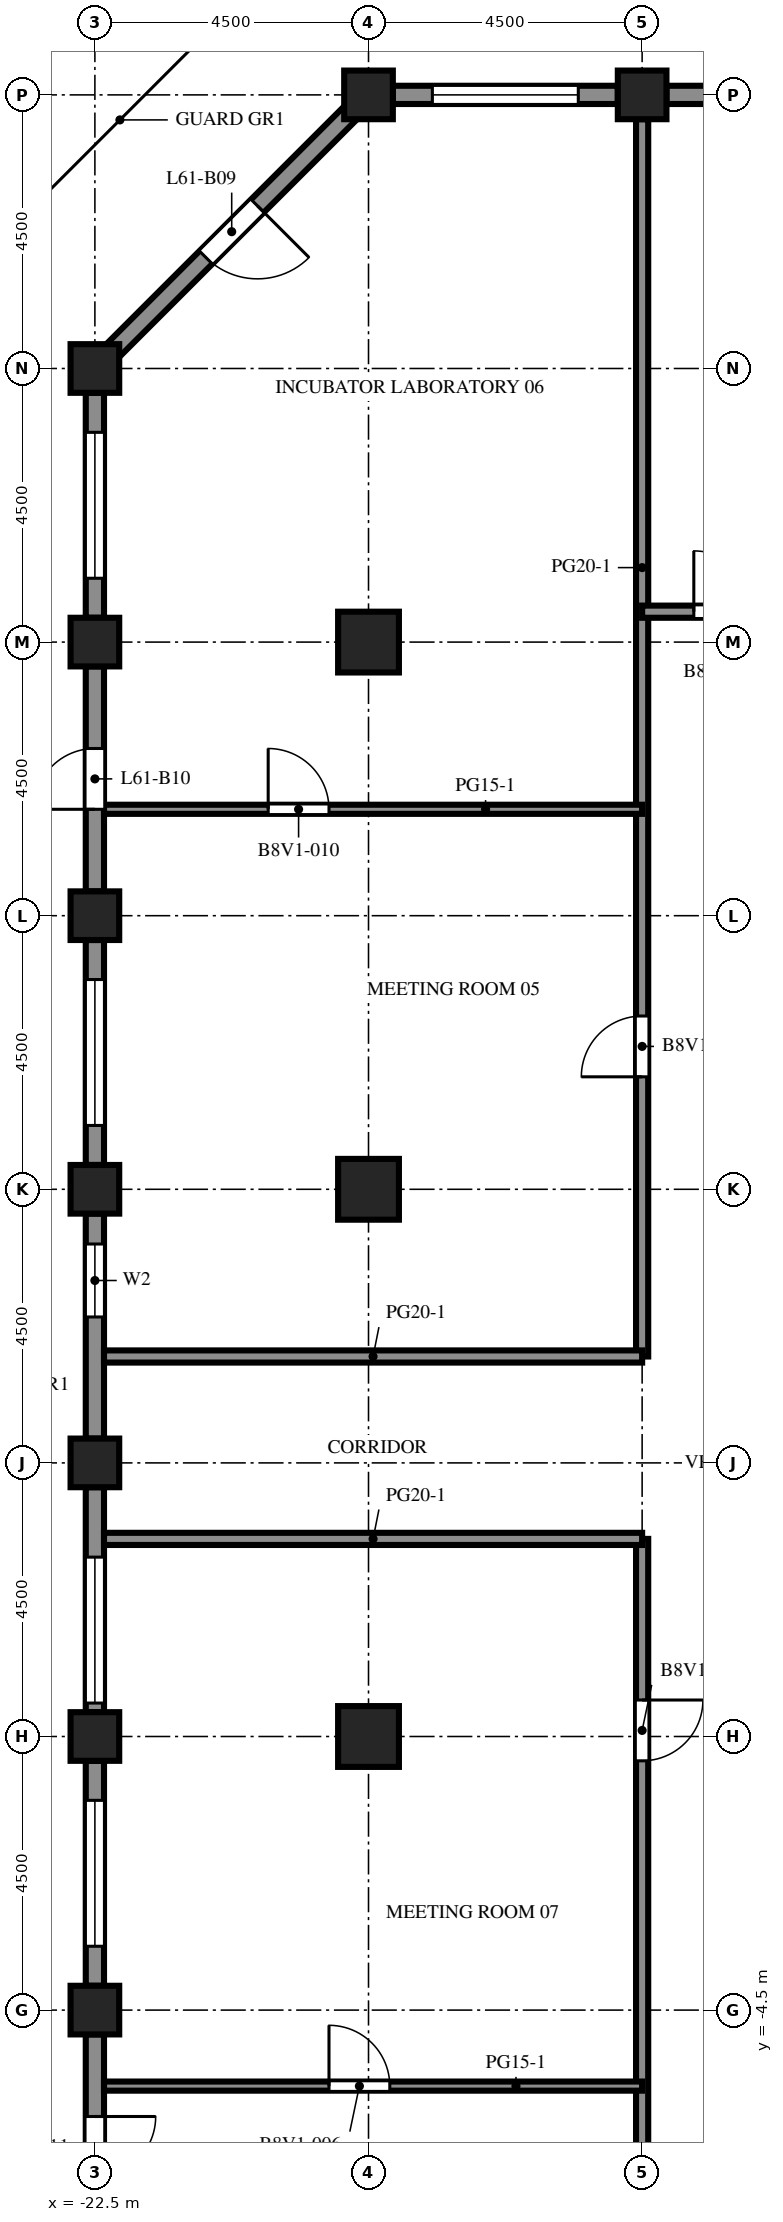
"""IFC4 building model, lengths in metres.
Left out: names, types, materials, properties, quantities, classifications, styles, units other than length and angle.
Written with IfcOpenShell. Run it as: python <this file> out.ifc"""

import sys

from ifc_helpers import new_model, si_unit, direction, frame, frame_2d, origin, origin_2d, place, context, subcontext, project, spatial, rectangle, extrude, element, fill, save


model = new_model("IFC4")
c1 = context("Model", 3, precision=1e-05, world=origin(), true_north=direction((0.0, 1.0)))
c2 = subcontext(c1, "Body", "Model", "MODEL_VIEW")
j1 = project(units=[si_unit("LENGTHUNIT", "METRE"), si_unit("PLANEANGLEUNIT", "RADIAN")], contexts=[c1])
p1 = place(None, origin())
s1 = spatial("IfcSite", under=j1, at=p1, CompositionType="ELEMENT")
p2 = place(p1, origin())
s2 = spatial("IfcBuilding", under=s1, at=p2, CompositionType="ELEMENT")
p3 = place(p2, frame((0.0, 0.0, 270.4)))
s3 = spatial("IfcBuildingStorey", under=s2, at=p3, CompositionType="ELEMENT", Elevation=270.4)
for number, where, z_axis, x_axis in (
    (1, (-22.5, -4.5, 0.0), (0.0, 0.0, 1.0), (1.0, 0.0, 0.0)),
    (2, (-22.5, 0.0, 0.0), (0.0, 0.0, 1.0), (1.0, 0.0, 0.0)),
    (3, (-22.5, 4.5, 0.0), (0.0, 0.0, 1.0), (1.0, 0.0, 0.0)),
    (4, (-22.5, 9.0, 0.0), (0.0, 0.0, 1.0), (1.0, 0.0, 0.0)),
    (5, (-22.5, 13.5, 0.0), (0.0, 0.0, 1.0), (1.0, 0.0, 0.0)),
    (6, (-22.5, 18.0, 0.0), (0.0, 0.0, 1.0), (1.0, 0.0, 0.0)),
    (7, (-22.5, 22.5, 0.0), (0.0, 0.0, 1.0), (1.0, 0.0, 0.0)),
    (8, (-18.0, 27.0, 0.0), (0.0, 0.0, 1.0), (1.0, 0.0, 0.0)),
    (9, (-13.5, 27.0, 0.0), (0.0, 0.0, 1.0), (1.0, 0.0, 0.0)),
):
    element("IfcColumn", number, at=place(p3, frame(where, z_axis=z_axis, x_axis=x_axis)), inside=s3, PredefinedType="COLUMN", context=c2, shape_type="SweptSolid", body=[
        extrude(rectangle(XDim=0.8, YDim=0.8, at=origin_2d()), origin(), (0.0, 0.0, 1.0), 4.1),
    ])
for number, where, z_axis, x_axis in (
    (10, (-18.0, 0.0, 0.0), (0.0, 0.0, 1.0), (1.0, 0.0, 0.0)),
    (11, (-18.0, 9.0, 0.0), (0.0, 0.0, 1.0), (1.0, 0.0, 0.0)),
    (12, (-18.0, 18.0, 0.0), (0.0, 0.0, 1.0), (1.0, 0.0, 0.0)),
):
    element("IfcColumn", number, at=place(p3, frame(where, z_axis=z_axis, x_axis=x_axis)), inside=s3, PredefinedType="COLUMN", context=c2, shape_type="SweptSolid", body=[
        extrude(rectangle(XDim=1.0, YDim=1.0, at=origin_2d()), origin(), (0.0, 0.0, 1.0), 4.1),
    ])
p4 = place(p3, frame((-13.1, 27.0, 0.0), z_axis=(0.0, 0.0, 1.0), x_axis=(1.0, 0.0, 0.0)))
e13 = element("IfcWall", 13, at=p4, inside=s3, PredefinedType="SOLIDWALL", context=c2, shape_type="SweptSolid", body=[
    extrude(rectangle(XDim=3.7, YDim=0.3, at=frame_2d((1.85, 0.0))), origin(), (0.0, 0.0, 1.0), 2.85),
])
p5 = place(p4, frame((1.35, 0.0, 0.0)))
e14 = element("IfcOpeningElement", 14, at=p5, cuts=e13, PredefinedType="OPENING", context=c2, shape_type="SweptSolid", body=[
    extrude(rectangle(XDim=1.0, YDim=2.2, at=frame_2d((0.5, 1.1))), frame((0.0, 0.16, 0.0), z_axis=(0.0, -1.0, 0.0), x_axis=(1.0, 0.0, 0.0)), (0.0, 0.0, 1.0), 0.32),
])
p6 = place(p3, frame((-17.6, 27.0, 0.0), z_axis=(0.0, 0.0, 1.0), x_axis=(1.0, 0.0, 0.0)))
e15 = element("IfcWall", 15, at=p6, inside=s3, PredefinedType="SOLIDWALL", context=c2, shape_type="SweptSolid", body=[
    extrude(rectangle(XDim=3.7, YDim=0.3, at=frame_2d((1.85, 0.0))), origin(), (0.0, 0.0, 1.0), 2.85),
])
p7 = place(p6, frame((0.65, 0.0, 0.8)))
e16 = element("IfcOpeningElement", 16, at=p7, cuts=e15, PredefinedType="OPENING", context=c2, shape_type="SweptSolid", body=[
    extrude(rectangle(XDim=2.4, YDim=1.7, at=frame_2d((1.2, 0.85))), frame((0.0, 0.16, 0.0), z_axis=(0.0, -1.0, 0.0), x_axis=(1.0, 0.0, 0.0)), (0.0, 0.0, 1.0), 0.32),
])
p8 = place(p3, frame((-22.206, 22.794, 0.0), z_axis=(0.0, 0.0, 1.0), x_axis=(0.707106781187, 0.707106781187, 0.0)))
e17 = element("IfcWall", 17, at=p8, inside=s3, PredefinedType="SOLIDWALL", context=c2, shape_type="SweptSolid", body=[
    extrude(rectangle(XDim=5.532, YDim=0.3, at=frame_2d((2.766, 0.0))), origin(), (0.0, 0.0, 1.0), 2.85),
])
p9 = place(p8, frame((2.166, 0.0, 0.0)))
e18 = element("IfcOpeningElement", 18, at=p9, cuts=e17, PredefinedType="OPENING", context=c2, shape_type="SweptSolid", body=[
    extrude(rectangle(XDim=1.2, YDim=2.2, at=frame_2d((0.6, 1.1))), frame((0.0, 0.16, 0.0), z_axis=(0.0, -1.0, 0.0), x_axis=(1.0, 0.0, 0.0)), (0.0, 0.0, 1.0), 0.32),
])
p10 = place(p3, frame((-22.5, 18.4, 0.0), z_axis=(0.0, 0.0, 1.0), x_axis=(0.0, 1.0, 0.0)))
e19 = element("IfcWall", 19, at=p10, inside=s3, PredefinedType="SOLIDWALL", context=c2, shape_type="SweptSolid", body=[
    extrude(rectangle(XDim=3.7, YDim=0.3, at=frame_2d((1.85, 0.0))), origin(), (0.0, 0.0, 1.0), 2.85),
])
p11 = place(p10, frame((0.65, 0.0, 0.8)))
e20 = element("IfcOpeningElement", 20, at=p11, cuts=e19, PredefinedType="OPENING", context=c2, shape_type="SweptSolid", body=[
    extrude(rectangle(XDim=2.4, YDim=1.7, at=frame_2d((1.2, 0.85))), frame((0.0, 0.16, 0.0), z_axis=(0.0, -1.0, 0.0), x_axis=(1.0, 0.0, 0.0)), (0.0, 0.0, 1.0), 0.32),
])
p12 = place(p3, frame((-22.5, 13.9, 0.0), z_axis=(0.0, 0.0, 1.0), x_axis=(0.0, 1.0, 0.0)))
e21 = element("IfcWall", 21, at=p12, inside=s3, PredefinedType="SOLIDWALL", context=c2, shape_type="SweptSolid", body=[
    extrude(rectangle(XDim=3.7, YDim=0.3, at=frame_2d((1.85, 0.0))), origin(), (0.0, 0.0, 1.0), 2.85),
])
p13 = place(p12, frame((1.35, 0.0, 0.0)))
e22 = element("IfcOpeningElement", 22, at=p13, cuts=e21, PredefinedType="OPENING", context=c2, shape_type="SweptSolid", body=[
    extrude(rectangle(XDim=1.0, YDim=2.2, at=frame_2d((0.5, 1.1))), frame((0.0, 0.16, 0.0), z_axis=(0.0, -1.0, 0.0), x_axis=(1.0, 0.0, 0.0)), (0.0, 0.0, 1.0), 0.32),
])
p14 = place(p3, frame((-22.5, 9.4, 0.0), z_axis=(0.0, 0.0, 1.0), x_axis=(0.0, 1.0, 0.0)))
e23 = element("IfcWall", 23, at=p14, inside=s3, PredefinedType="SOLIDWALL", context=c2, shape_type="SweptSolid", body=[
    extrude(rectangle(XDim=3.7, YDim=0.3, at=frame_2d((1.85, 0.0))), origin(), (0.0, 0.0, 1.0), 2.85),
])
p15 = place(p14, frame((0.65, 0.0, 0.8)))
e24 = element("IfcOpeningElement", 24, at=p15, cuts=e23, PredefinedType="OPENING", context=c2, shape_type="SweptSolid", body=[
    extrude(rectangle(XDim=2.4, YDim=1.7, at=frame_2d((1.2, 0.85))), frame((0.0, 0.16, 0.0), z_axis=(0.0, -1.0, 0.0), x_axis=(1.0, 0.0, 0.0)), (0.0, 0.0, 1.0), 0.32),
])
p16 = place(p3, frame((-22.5, 4.9, 0.0), z_axis=(0.0, 0.0, 1.0), x_axis=(0.0, 1.0, 0.0)))
e25 = element("IfcWall", 25, at=p16, inside=s3, PredefinedType="SOLIDWALL", context=c2, shape_type="SweptSolid", body=[
    extrude(rectangle(XDim=3.7, YDim=0.3, at=frame_2d((1.85, 0.0))), origin(), (0.0, 0.0, 1.0), 2.85),
])
p17 = place(p16, frame((2.0, 0.0, 0.8)))
e26 = element("IfcOpeningElement", 26, at=p17, cuts=e25, PredefinedType="OPENING", context=c2, shape_type="SweptSolid", body=[
    extrude(rectangle(XDim=1.2, YDim=1.7, at=frame_2d((0.6, 0.85))), frame((0.0, 0.16, 0.0), z_axis=(0.0, -1.0, 0.0), x_axis=(1.0, 0.0, 0.0)), (0.0, 0.0, 1.0), 0.32),
])
p18 = place(p3, frame((-22.5, 0.4, 0.0), z_axis=(0.0, 0.0, 1.0), x_axis=(0.0, 1.0, 0.0)))
e27 = element("IfcWall", 27, at=p18, inside=s3, PredefinedType="SOLIDWALL", context=c2, shape_type="SweptSolid", body=[
    extrude(rectangle(XDim=3.7, YDim=0.3, at=frame_2d((1.85, 0.0))), origin(), (0.0, 0.0, 1.0), 2.85),
])
p19 = place(p18, frame((0.15, 0.0, 0.8)))
e28 = element("IfcOpeningElement", 28, at=p19, cuts=e27, PredefinedType="OPENING", context=c2, shape_type="SweptSolid", body=[
    extrude(rectangle(XDim=2.4, YDim=1.7, at=frame_2d((1.2, 0.85))), frame((0.0, 0.16, 0.0), z_axis=(0.0, -1.0, 0.0), x_axis=(1.0, 0.0, 0.0)), (0.0, 0.0, 1.0), 0.32),
])
p20 = place(p3, frame((-22.5, -4.1, 0.0), z_axis=(0.0, 0.0, 1.0), x_axis=(0.0, 1.0, 0.0)))
e29 = element("IfcWall", 29, at=p20, inside=s3, PredefinedType="SOLIDWALL", context=c2, shape_type="SweptSolid", body=[
    extrude(rectangle(XDim=3.7, YDim=0.3, at=frame_2d((1.85, 0.0))), origin(), (0.0, 0.0, 1.0), 2.85),
])
p21 = place(p20, frame((0.65, 0.0, 0.8)))
e30 = element("IfcOpeningElement", 30, at=p21, cuts=e29, PredefinedType="OPENING", context=c2, shape_type="SweptSolid", body=[
    extrude(rectangle(XDim=2.4, YDim=1.7, at=frame_2d((1.2, 0.85))), frame((0.0, 0.16, 0.0), z_axis=(0.0, -1.0, 0.0), x_axis=(1.0, 0.0, 0.0)), (0.0, 0.0, 1.0), 0.32),
])
p22 = place(p3, frame((-22.5, -8.6, 0.0), z_axis=(0.0, 0.0, 1.0), x_axis=(0.0, 1.0, 0.0)))
e31 = element("IfcWall", 31, at=p22, inside=s3, PredefinedType="SOLIDWALL", context=c2, shape_type="SweptSolid", body=[
    extrude(rectangle(XDim=3.7, YDim=0.3, at=frame_2d((1.85, 0.0))), origin(), (0.0, 0.0, 1.0), 2.85),
])
p23 = place(p22, frame((1.35, 0.0, 0.0)))
e32 = element("IfcOpeningElement", 32, at=p23, cuts=e31, PredefinedType="OPENING", context=c2, shape_type="SweptSolid", body=[
    extrude(rectangle(XDim=1.0, YDim=2.2, at=frame_2d((0.5, 1.1))), frame((0.0, 0.16, 0.0), z_axis=(0.0, -1.0, 0.0), x_axis=(1.0, 0.0, 0.0)), (0.0, 0.0, 1.0), 0.32),
])
p24 = place(p3, frame((-13.5, -17.6, 0.0), z_axis=(0.0, 0.0, 1.0), x_axis=(0.0, 1.0, 0.0)))
e33 = element("IfcWall", 33, at=p24, inside=s3, PredefinedType="PARTITIONING", context=c2, shape_type="SweptSolid", body=[
    extrude(rectangle(XDim=20.85, YDim=0.2, at=frame_2d((10.425, 0.0))), origin(), (0.0, 0.0, 1.0), 3.65),
])
p25 = place(p24, frame((17.2, 0.0, 0.0)))
e34 = element("IfcOpeningElement", 34, at=p25, cuts=e33, PredefinedType="OPENING", context=c2, shape_type="SweptSolid", body=[
    extrude(rectangle(XDim=1.0, YDim=2.1, at=frame_2d((0.5, 1.05))), frame((0.0, 0.11, 0.0), z_axis=(0.0, -1.0, 0.0), x_axis=(1.0, 0.0, 0.0)), (0.0, 0.0, 1.0), 0.22),
])
p26 = place(p3, frame((-13.5, 6.25, 0.0), z_axis=(0.0, 0.0, 1.0), x_axis=(0.0, 1.0, 0.0)))
e35 = element("IfcWall", 35, at=p26, inside=s3, PredefinedType="PARTITIONING", context=c2, shape_type="SweptSolid", body=[
    extrude(rectangle(XDim=20.35, YDim=0.2, at=frame_2d((10.175, 0.0))), origin(), (0.0, 0.0, 1.0), 3.65),
])
p27 = place(p26, frame((4.6, 0.0, 0.0)))
e36 = element("IfcOpeningElement", 36, at=p27, cuts=e35, PredefinedType="OPENING", context=c2, shape_type="SweptSolid", body=[
    extrude(rectangle(XDim=1.0, YDim=2.1, at=frame_2d((0.5, 1.05))), frame((0.0, 0.11, 0.0), z_axis=(0.0, -1.0, 0.0), x_axis=(1.0, 0.0, 0.0)), (0.0, 0.0, 1.0), 0.22),
])
p28 = place(p3, frame((-13.5, -5.75, 0.0), z_axis=(0.0, 0.0, 1.0), x_axis=(-1.0, 0.0, 0.0)))
e37 = element("IfcWall", 37, at=p28, inside=s3, PredefinedType="PARTITIONING", context=c2, shape_type="SweptSolid", body=[
    extrude(rectangle(XDim=8.85, YDim=0.15, at=frame_2d((4.425, 0.0))), origin(), (0.0, 0.0, 1.0), 3.65),
])
p29 = place(p28, frame((4.15, 0.0, 0.0)))
e38 = element("IfcOpeningElement", 38, at=p29, cuts=e37, PredefinedType="OPENING", context=c2, shape_type="SweptSolid", body=[
    extrude(rectangle(XDim=1.0, YDim=2.1, at=frame_2d((0.5, 1.05))), frame((0.0, 0.085, 0.0), z_axis=(0.0, -1.0, 0.0), x_axis=(1.0, 0.0, 0.0)), (0.0, 0.0, 1.0), 0.17),
])
for number, where, z_axis, x_axis in (
    (39, (-22.35, 3.25, 0.0), (0.0, 0.0, 1.0), (1.0, 0.0, 0.0)),
    (40, (-22.35, 6.25, 0.0), (0.0, 0.0, 1.0), (1.0, 0.0, 0.0)),
):
    element("IfcWall", number, at=place(p3, frame(where, z_axis=z_axis, x_axis=x_axis)), inside=s3, PredefinedType="PARTITIONING", context=c2, shape_type="SweptSolid", body=[
        extrude(rectangle(XDim=8.85, YDim=0.2, at=frame_2d((4.425, 0.0))), origin(), (0.0, 0.0, 1.0), 3.65),
    ])
p30 = place(p3, frame((-22.35, 15.25, 0.0), z_axis=(0.0, 0.0, 1.0), x_axis=(1.0, 0.0, 0.0)))
e41 = element("IfcWall", 41, at=p30, inside=s3, PredefinedType="PARTITIONING", context=c2, shape_type="SweptSolid", body=[
    extrude(rectangle(XDim=8.85, YDim=0.15, at=frame_2d((4.425, 0.0))), origin(), (0.0, 0.0, 1.0), 3.65),
])
p31 = place(p30, frame((2.7, 0.0, 0.0)))
e42 = element("IfcOpeningElement", 42, at=p31, cuts=e41, PredefinedType="OPENING", context=c2, shape_type="SweptSolid", body=[
    extrude(rectangle(XDim=1.0, YDim=2.1, at=frame_2d((0.5, 1.05))), frame((0.0, 0.085, 0.0), z_axis=(0.0, -1.0, 0.0), x_axis=(1.0, 0.0, 0.0)), (0.0, 0.0, 1.0), 0.17),
])
p32 = place(p3, frame((-13.5, 18.5, 0.0), z_axis=(0.0, 0.0, 1.0), x_axis=(1.0, 0.0, 0.0)))
e43 = element("IfcWall", 43, at=p32, inside=s3, PredefinedType="PARTITIONING", context=c2, shape_type="SweptSolid", body=[
    extrude(rectangle(XDim=3.0, YDim=0.2, at=frame_2d((1.5, 0.0))), origin(), (0.0, 0.0, 1.0), 3.65),
])
p33 = place(p32, frame((0.85, 0.0, 0.0)))
e44 = element("IfcOpeningElement", 44, at=p33, cuts=e43, PredefinedType="OPENING", context=c2, shape_type="SweptSolid", body=[
    extrude(rectangle(XDim=1.0, YDim=2.1, at=frame_2d((0.5, 1.05))), frame((0.0, 0.11, 0.0), z_axis=(0.0, -1.0, 0.0), x_axis=(1.0, 0.0, 0.0)), (0.0, 0.0, 1.0), 0.22),
])
p34 = place(p7, origin())
e45 = element("IfcWindow", 45, at=p34, inside=s3, PartitioningType="SINGLE_PANEL", PredefinedType="WINDOW", context=c2, shape_type="SweptSolid", body=[
    extrude(rectangle(XDim=2.4, YDim=1.7, at=frame_2d((1.2, 0.85))), frame((0.0, 0.03, 0.0), z_axis=(0.0, -1.0, 0.0), x_axis=(1.0, 0.0, 0.0)), (0.0, 0.0, 1.0), 0.06),
])
fill(e16, e45)
p35 = place(p9, origin())
e46 = element("IfcDoor", 46, at=p35, inside=s3, OperationType="SINGLE_SWING_RIGHT", PredefinedType="DOOR", context=c2, shape_type="SweptSolid", body=[
    extrude(rectangle(XDim=1.2, YDim=2.2, at=frame_2d((0.6, 1.1))), frame((0.0, 0.025, 0.0), z_axis=(0.0, -1.0, 0.0), x_axis=(1.0, 0.0, 0.0)), (0.0, 0.0, 1.0), 0.05),
])
fill(e18, e46)
p36 = place(p11, origin())
e47 = element("IfcWindow", 47, at=p36, inside=s3, PartitioningType="SINGLE_PANEL", PredefinedType="WINDOW", context=c2, shape_type="SweptSolid", body=[
    extrude(rectangle(XDim=2.4, YDim=1.7, at=frame_2d((1.2, 0.85))), frame((0.0, 0.03, 0.0), z_axis=(0.0, -1.0, 0.0), x_axis=(1.0, 0.0, 0.0)), (0.0, 0.0, 1.0), 0.06),
])
fill(e20, e47)
p37 = place(p13, origin())
e48 = element("IfcDoor", 48, at=p37, inside=s3, OperationType="SINGLE_SWING_LEFT", PredefinedType="DOOR", context=c2, shape_type="SweptSolid", body=[
    extrude(rectangle(XDim=1.0, YDim=2.2, at=frame_2d((0.5, 1.1))), frame((0.0, 0.025, 0.0), z_axis=(0.0, -1.0, 0.0), x_axis=(1.0, 0.0, 0.0)), (0.0, 0.0, 1.0), 0.05),
])
fill(e22, e48)
p38 = place(p15, origin())
e49 = element("IfcWindow", 49, at=p38, inside=s3, PartitioningType="SINGLE_PANEL", PredefinedType="WINDOW", context=c2, shape_type="SweptSolid", body=[
    extrude(rectangle(XDim=2.4, YDim=1.7, at=frame_2d((1.2, 0.85))), frame((0.0, 0.03, 0.0), z_axis=(0.0, -1.0, 0.0), x_axis=(1.0, 0.0, 0.0)), (0.0, 0.0, 1.0), 0.06),
])
fill(e24, e49)
p39 = place(p17, origin())
e50 = element("IfcWindow", 50, at=p39, inside=s3, PartitioningType="SINGLE_PANEL", PredefinedType="WINDOW", context=c2, shape_type="SweptSolid", body=[
    extrude(rectangle(XDim=1.2, YDim=1.7, at=frame_2d((0.6, 0.85))), frame((0.0, 0.03, 0.0), z_axis=(0.0, -1.0, 0.0), x_axis=(1.0, 0.0, 0.0)), (0.0, 0.0, 1.0), 0.06),
])
fill(e26, e50)
p40 = place(p19, origin())
e51 = element("IfcWindow", 51, at=p40, inside=s3, PartitioningType="SINGLE_PANEL", PredefinedType="WINDOW", context=c2, shape_type="SweptSolid", body=[
    extrude(rectangle(XDim=2.4, YDim=1.7, at=frame_2d((1.2, 0.85))), frame((0.0, 0.03, 0.0), z_axis=(0.0, -1.0, 0.0), x_axis=(1.0, 0.0, 0.0)), (0.0, 0.0, 1.0), 0.06),
])
fill(e28, e51)
p41 = place(p21, origin())
e52 = element("IfcWindow", 52, at=p41, inside=s3, PartitioningType="SINGLE_PANEL", PredefinedType="WINDOW", context=c2, shape_type="SweptSolid", body=[
    extrude(rectangle(XDim=2.4, YDim=1.7, at=frame_2d((1.2, 0.85))), frame((0.0, 0.03, 0.0), z_axis=(0.0, -1.0, 0.0), x_axis=(1.0, 0.0, 0.0)), (0.0, 0.0, 1.0), 0.06),
])
fill(e30, e52)
p42 = place(p23, origin())
e53 = element("IfcDoor", 53, at=p42, inside=s3, OperationType="SINGLE_SWING_RIGHT", PredefinedType="DOOR", context=c2, shape_type="SweptSolid", body=[
    extrude(rectangle(XDim=1.0, YDim=2.2, at=frame_2d((0.5, 1.1))), frame((0.0, 0.025, 0.0), z_axis=(0.0, -1.0, 0.0), x_axis=(1.0, 0.0, 0.0)), (0.0, 0.0, 1.0), 0.05),
])
fill(e32, e53)
p43 = place(p25, origin())
e54 = element("IfcDoor", 54, at=p43, inside=s3, OperationType="SINGLE_SWING_RIGHT", PredefinedType="DOOR", context=c2, shape_type="SweptSolid", body=[
    extrude(rectangle(XDim=1.0, YDim=2.1, at=frame_2d((0.5, 1.05))), frame((0.0, 0.025, 0.0), z_axis=(0.0, -1.0, 0.0), x_axis=(1.0, 0.0, 0.0)), (0.0, 0.0, 1.0), 0.05),
])
fill(e34, e54)
p44 = place(p27, origin())
e55 = element("IfcDoor", 55, at=p44, inside=s3, OperationType="SINGLE_SWING_LEFT", PredefinedType="DOOR", context=c2, shape_type="SweptSolid", body=[
    extrude(rectangle(XDim=1.0, YDim=2.1, at=frame_2d((0.5, 1.05))), frame((0.0, 0.025, 0.0), z_axis=(0.0, -1.0, 0.0), x_axis=(1.0, 0.0, 0.0)), (0.0, 0.0, 1.0), 0.05),
])
fill(e36, e55)
p45 = place(p29, origin())
e56 = element("IfcDoor", 56, at=p45, inside=s3, OperationType="SINGLE_SWING_RIGHT", PredefinedType="DOOR", context=c2, shape_type="SweptSolid", body=[
    extrude(rectangle(XDim=1.0, YDim=2.1, at=frame_2d((0.5, 1.05))), frame((0.0, 0.025, 0.0), z_axis=(0.0, -1.0, 0.0), x_axis=(1.0, 0.0, 0.0)), (0.0, 0.0, 1.0), 0.05),
])
fill(e38, e56)
p46 = place(p31, origin())
e57 = element("IfcDoor", 57, at=p46, inside=s3, OperationType="SINGLE_SWING_LEFT", PredefinedType="DOOR", context=c2, shape_type="SweptSolid", body=[
    extrude(rectangle(XDim=1.0, YDim=2.1, at=frame_2d((0.5, 1.05))), frame((0.0, 0.025, 0.0), z_axis=(0.0, -1.0, 0.0), x_axis=(1.0, 0.0, 0.0)), (0.0, 0.0, 1.0), 0.05),
])
fill(e42, e57)
p47 = place(p33, origin())
e58 = element("IfcDoor", 58, at=p47, inside=s3, OperationType="SINGLE_SWING_LEFT", PredefinedType="DOOR", context=c2, shape_type="SweptSolid", body=[
    extrude(rectangle(XDim=1.0, YDim=2.1, at=frame_2d((0.5, 1.05))), frame((0.0, 0.025, 0.0), z_axis=(0.0, -1.0, 0.0), x_axis=(1.0, 0.0, 0.0)), (0.0, 0.0, 1.0), 0.05),
])
fill(e44, e58)
save(model, sys.argv[1])
